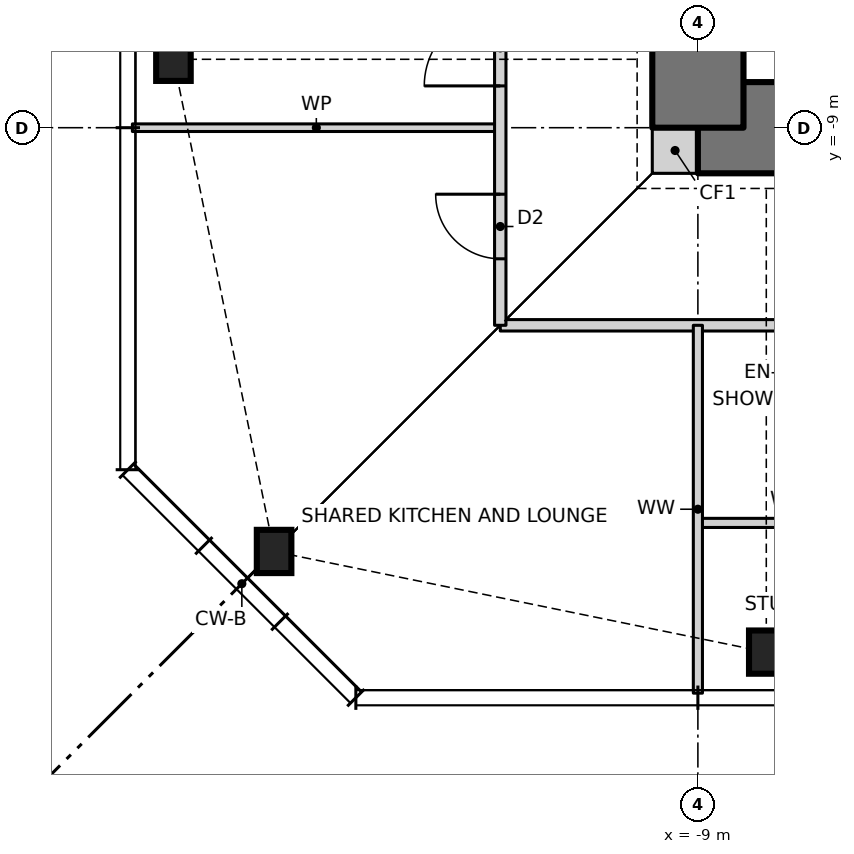
"""IFC4 building model, lengths in metres.
Left out: names, types, materials, properties, quantities, classifications, styles, units other than length and angle.
Written with IfcOpenShell. Run it as: python <this file> out.ifc"""

import sys

from ifc_helpers import new_model, si_unit, direction, frame, frame_2d, origin, origin_2d, place, context, subcontext, project, spatial, rectangle, i_section, extrude, element, fill, save


model = new_model("IFC4")
c1 = context("Model", 3, precision=1e-05, world=origin(), true_north=direction((0.0, 1.0)))
c2 = subcontext(c1, "Body", "Model", "MODEL_VIEW")
j1 = project(units=[si_unit("LENGTHUNIT", "METRE"), si_unit("PLANEANGLEUNIT", "RADIAN")], contexts=[c1])
p1 = place(None, origin())
s1 = spatial("IfcSite", under=j1, at=p1, CompositionType="ELEMENT")
p2 = place(p1, origin())
s2 = spatial("IfcBuilding", under=s1, at=p2, CompositionType="ELEMENT")
p3 = place(p2, frame((0.0, 0.0, 225.5)))
s3 = spatial("IfcBuildingStorey", under=s2, at=p3, CompositionType="ELEMENT", Elevation=225.5)
for number, where, z_axis, x_axis in (
    (1, (-14.576, -14.576, 0.0), (0.0, 0.0, 1.0), (1.0, 0.0, 0.0)),
    (2, (-8.1, -15.9, 0.0), (0.0, 0.0, 1.0), (1.0, 0.0, 0.0)),
    (3, (-15.9, -8.1, 0.0), (0.0, 0.0, 1.0), (1.0, 0.0, 0.0)),
):
    element("IfcColumn", number, at=place(p3, frame(where, z_axis=z_axis, x_axis=x_axis)), inside=s3, PredefinedType="COLUMN", context=c2, shape_type="SweptSolid", body=[
        extrude(i_section(OverallWidth=0.455, OverallDepth=0.569, WebThickness=0.078, FlangeThickness=0.125, at=origin_2d()), origin(), (0.0, 0.0, 1.0), 3.5),
    ])
p4 = place(p3, frame((-9.6, -9.3, 0.0), z_axis=(0.0, 0.0, 1.0), x_axis=(1.0, 0.0, 0.0)))
e4 = element("IfcWall", 4, at=p4, inside=s3, PredefinedType="SOLIDWALL", context=c2, shape_type="SweptSolid", body=[
    extrude(rectangle(XDim=0.6, YDim=0.6, at=frame_2d((0.3, 0.0))), origin(), (0.0, 0.0, 1.0), 3.5),
])
p5 = place(p3, frame((-9.0, -9.0, 0.0), z_axis=(0.0, 0.0, 1.0), x_axis=(1.0, 0.0, 0.0)))
e5 = element("IfcWall", 5, at=p5, inside=s3, PredefinedType="SHEAR", context=c2, shape_type="SweptSolid", body=[
    extrude(rectangle(XDim=18.0, YDim=1.2, at=frame_2d((9.0, 0.0))), origin(), (0.0, 0.0, 1.0), 3.5),
])
p6 = place(p5, frame((3.775, 0.0, 0.0)))
e6 = element("IfcOpeningElement", 6, at=p6, cuts=e5, PredefinedType="OPENING", context=c2, shape_type="SweptSolid", body=[
    extrude(rectangle(XDim=0.9, YDim=2.1, at=frame_2d((0.45, 1.05))), frame((0.0, 0.61, 0.0), z_axis=(0.0, -1.0, 0.0), x_axis=(1.0, 0.0, 0.0)), (0.0, 0.0, 1.0), 1.22),
])
p7 = place(p5, frame((10.625, 0.0, 0.0)))
e7 = element("IfcOpeningElement", 7, at=p7, cuts=e5, PredefinedType="OPENING", context=c2, shape_type="SweptSolid", body=[
    extrude(rectangle(XDim=0.9, YDim=2.1, at=frame_2d((0.45, 1.05))), frame((0.0, 0.61, 0.0), z_axis=(0.0, -1.0, 0.0), x_axis=(1.0, 0.0, 0.0)), (0.0, 0.0, 1.0), 1.22),
])
p8 = place(p3, frame((-9.0, 9.0, 0.0), z_axis=(0.0, 0.0, 1.0), x_axis=(0.0, -1.0, 0.0)))
e8 = element("IfcWall", 8, at=p8, inside=s3, PredefinedType="SHEAR", context=c2, shape_type="SweptSolid", body=[
    extrude(rectangle(XDim=18.0, YDim=1.2, at=frame_2d((9.0, 0.0))), origin(), (0.0, 0.0, 1.0), 3.5),
])
p9 = place(p8, frame((8.5, 0.0, 0.0)))
e9 = element("IfcOpeningElement", 9, at=p9, cuts=e8, PredefinedType="OPENING", context=c2, shape_type="SweptSolid", body=[
    extrude(rectangle(XDim=1.0, YDim=2.1, at=frame_2d((0.5, 1.05))), frame((0.0, 0.61, 0.0), z_axis=(0.0, -1.0, 0.0), x_axis=(1.0, 0.0, 0.0)), (0.0, 0.0, 1.0), 1.22),
])
p10 = place(p3, frame((-9.0, -14.2, 0.0), z_axis=(0.0, 0.0, 1.0), x_axis=(1.0, 0.0, 0.0)))
e10 = element("IfcWall", 10, at=p10, inside=s3, PredefinedType="PARTITIONING", context=c2, shape_type="SweptSolid", body=[
    extrude(rectangle(XDim=2.4, YDim=0.12, at=frame_2d((1.2, 0.0))), origin(), (0.0, 0.0, 1.0), 3.27),
])
p11 = place(p3, frame((-11.6, -11.6, 0.0), z_axis=(0.0, 0.0, 1.0), x_axis=(1.0, 0.0, 0.0)))
e11 = element("IfcWall", 11, at=p11, inside=s3, PredefinedType="PARTITIONING", context=c2, shape_type="SweptSolid", body=[
    extrude(rectangle(XDim=23.2, YDim=0.15, at=frame_2d((11.6, 0.0))), origin(), (0.0, 0.0, 1.0), 3.27),
])
p12 = place(p11, frame((5.55, 0.0, 0.0)))
e12 = element("IfcOpeningElement", 12, at=p12, cuts=e11, PredefinedType="OPENING", context=c2, shape_type="SweptSolid", body=[
    extrude(rectangle(XDim=1.0, YDim=2.1, at=frame_2d((0.5, 1.05))), frame((0.0, 0.085, 0.0), z_axis=(0.0, -1.0, 0.0), x_axis=(1.0, 0.0, 0.0)), (0.0, 0.0, 1.0), 0.17),
])
p13 = place(p11, frame((7.65, 0.0, 0.0)))
e13 = element("IfcOpeningElement", 13, at=p13, cuts=e11, PredefinedType="OPENING", context=c2, shape_type="SweptSolid", body=[
    extrude(rectangle(XDim=1.0, YDim=2.1, at=frame_2d((0.5, 1.05))), frame((0.0, 0.085, 0.0), z_axis=(0.0, -1.0, 0.0), x_axis=(1.0, 0.0, 0.0)), (0.0, 0.0, 1.0), 0.17),
])
p14 = place(p11, frame((14.55, 0.0, 0.0)))
e14 = element("IfcOpeningElement", 14, at=p14, cuts=e11, PredefinedType="OPENING", context=c2, shape_type="SweptSolid", body=[
    extrude(rectangle(XDim=1.0, YDim=2.1, at=frame_2d((0.5, 1.05))), frame((0.0, 0.085, 0.0), z_axis=(0.0, -1.0, 0.0), x_axis=(1.0, 0.0, 0.0)), (0.0, 0.0, 1.0), 0.17),
])
p15 = place(p11, frame((16.65, 0.0, 0.0)))
e15 = element("IfcOpeningElement", 15, at=p15, cuts=e11, PredefinedType="OPENING", context=c2, shape_type="SweptSolid", body=[
    extrude(rectangle(XDim=1.0, YDim=2.1, at=frame_2d((0.5, 1.05))), frame((0.0, 0.085, 0.0), z_axis=(0.0, -1.0, 0.0), x_axis=(1.0, 0.0, 0.0)), (0.0, 0.0, 1.0), 0.17),
])
p16 = place(p11, frame((21.0, 0.0, 0.0)))
e16 = element("IfcOpeningElement", 16, at=p16, cuts=e11, PredefinedType="OPENING", context=c2, shape_type="SweptSolid", body=[
    extrude(rectangle(XDim=1.8, YDim=2.1, at=frame_2d((0.9, 1.05))), frame((0.0, 0.085, 0.0), z_axis=(0.0, -1.0, 0.0), x_axis=(1.0, 0.0, 0.0)), (0.0, 0.0, 1.0), 0.17),
])
p17 = place(p3, frame((-16.44, -9.0, 0.0), z_axis=(0.0, 0.0, 1.0), x_axis=(1.0, 0.0, 0.0)))
e17 = element("IfcWall", 17, at=p17, inside=s3, PredefinedType="PARTITIONING", context=c2, shape_type="SweptSolid", body=[
    extrude(rectangle(XDim=4.84, YDim=0.1, at=frame_2d((2.42, 0.0))), origin(), (0.0, 0.0, 1.0), 3.27),
])
p18 = place(p3, frame((-9.0, -16.44, 0.0), z_axis=(0.0, 0.0, 1.0), x_axis=(0.0, 1.0, 0.0)))
e18 = element("IfcWall", 18, at=p18, inside=s3, PredefinedType="PARTITIONING", context=c2, shape_type="SweptSolid", body=[
    extrude(rectangle(XDim=4.84, YDim=0.12, at=frame_2d((2.42, 0.0))), origin(), (0.0, 0.0, 1.0), 3.27),
])
p19 = place(p3, frame((-11.6, -11.6, 0.0), z_axis=(0.0, 0.0, 1.0), x_axis=(0.0, 1.0, 0.0)))
e19 = element("IfcWall", 19, at=p19, inside=s3, PredefinedType="PARTITIONING", context=c2, shape_type="SweptSolid", body=[
    extrude(rectangle(XDim=23.2, YDim=0.15, at=frame_2d((11.6, 0.0))), origin(), (0.0, 0.0, 1.0), 3.27),
])
p20 = place(p19, frame((16.5, 0.0, 0.0)))
e20 = element("IfcOpeningElement", 20, at=p20, cuts=e19, PredefinedType="OPENING", context=c2, shape_type="SweptSolid", body=[
    extrude(rectangle(XDim=1.0, YDim=2.1, at=frame_2d((0.5, 1.05))), frame((0.0, 0.085, 0.0), z_axis=(0.0, -1.0, 0.0), x_axis=(1.0, 0.0, 0.0)), (0.0, 0.0, 1.0), 0.17),
])
p21 = place(p19, frame((10.05, 0.0, 0.0)))
e21 = element("IfcOpeningElement", 21, at=p21, cuts=e19, PredefinedType="OPENING", context=c2, shape_type="SweptSolid", body=[
    extrude(rectangle(XDim=1.0, YDim=2.1, at=frame_2d((0.5, 1.05))), frame((0.0, 0.085, 0.0), z_axis=(0.0, -1.0, 0.0), x_axis=(1.0, 0.0, 0.0)), (0.0, 0.0, 1.0), 0.17),
])
p22 = place(p19, frame((3.15, 0.0, 0.0)))
e22 = element("IfcOpeningElement", 22, at=p22, cuts=e19, PredefinedType="OPENING", context=c2, shape_type="SweptSolid", body=[
    extrude(rectangle(XDim=1.0, YDim=2.1, at=frame_2d((0.5, 1.05))), frame((0.0, 0.085, 0.0), z_axis=(0.0, -1.0, 0.0), x_axis=(1.0, 0.0, 0.0)), (0.0, 0.0, 1.0), 0.17),
])
p23 = place(p19, frame((0.875, 0.0, 0.0)))
e23 = element("IfcOpeningElement", 23, at=p23, cuts=e19, PredefinedType="OPENING", context=c2, shape_type="SweptSolid", body=[
    extrude(rectangle(XDim=0.85, YDim=2.1, at=frame_2d((0.425, 1.05))), frame((0.0, 0.085, 0.0), z_axis=(0.0, -1.0, 0.0), x_axis=(1.0, 0.0, 0.0)), (0.0, 0.0, 1.0), 0.17),
])
p24 = place(p22, origin())
e24 = element("IfcDoor", 24, at=p24, inside=s3, OperationType="SINGLE_SWING_LEFT", PredefinedType="DOOR", context=c2, shape_type="SweptSolid", body=[
    extrude(rectangle(XDim=1.0, YDim=2.1, at=frame_2d((0.5, 1.05))), frame((0.0, 0.025, 0.0), z_axis=(0.0, -1.0, 0.0), x_axis=(1.0, 0.0, 0.0)), (0.0, 0.0, 1.0), 0.05),
])
fill(e22, e24)
p25 = place(p23, origin())
e25 = element("IfcDoor", 25, at=p25, inside=s3, OperationType="SINGLE_SWING_RIGHT", PredefinedType="DOOR", context=c2, shape_type="SweptSolid", body=[
    extrude(rectangle(XDim=0.85, YDim=2.1, at=frame_2d((0.425, 1.05))), frame((0.0, 0.025, 0.0), z_axis=(0.0, -1.0, 0.0), x_axis=(1.0, 0.0, 0.0)), (0.0, 0.0, 1.0), 0.05),
])
fill(e23, e25)
save(model, sys.argv[1])
